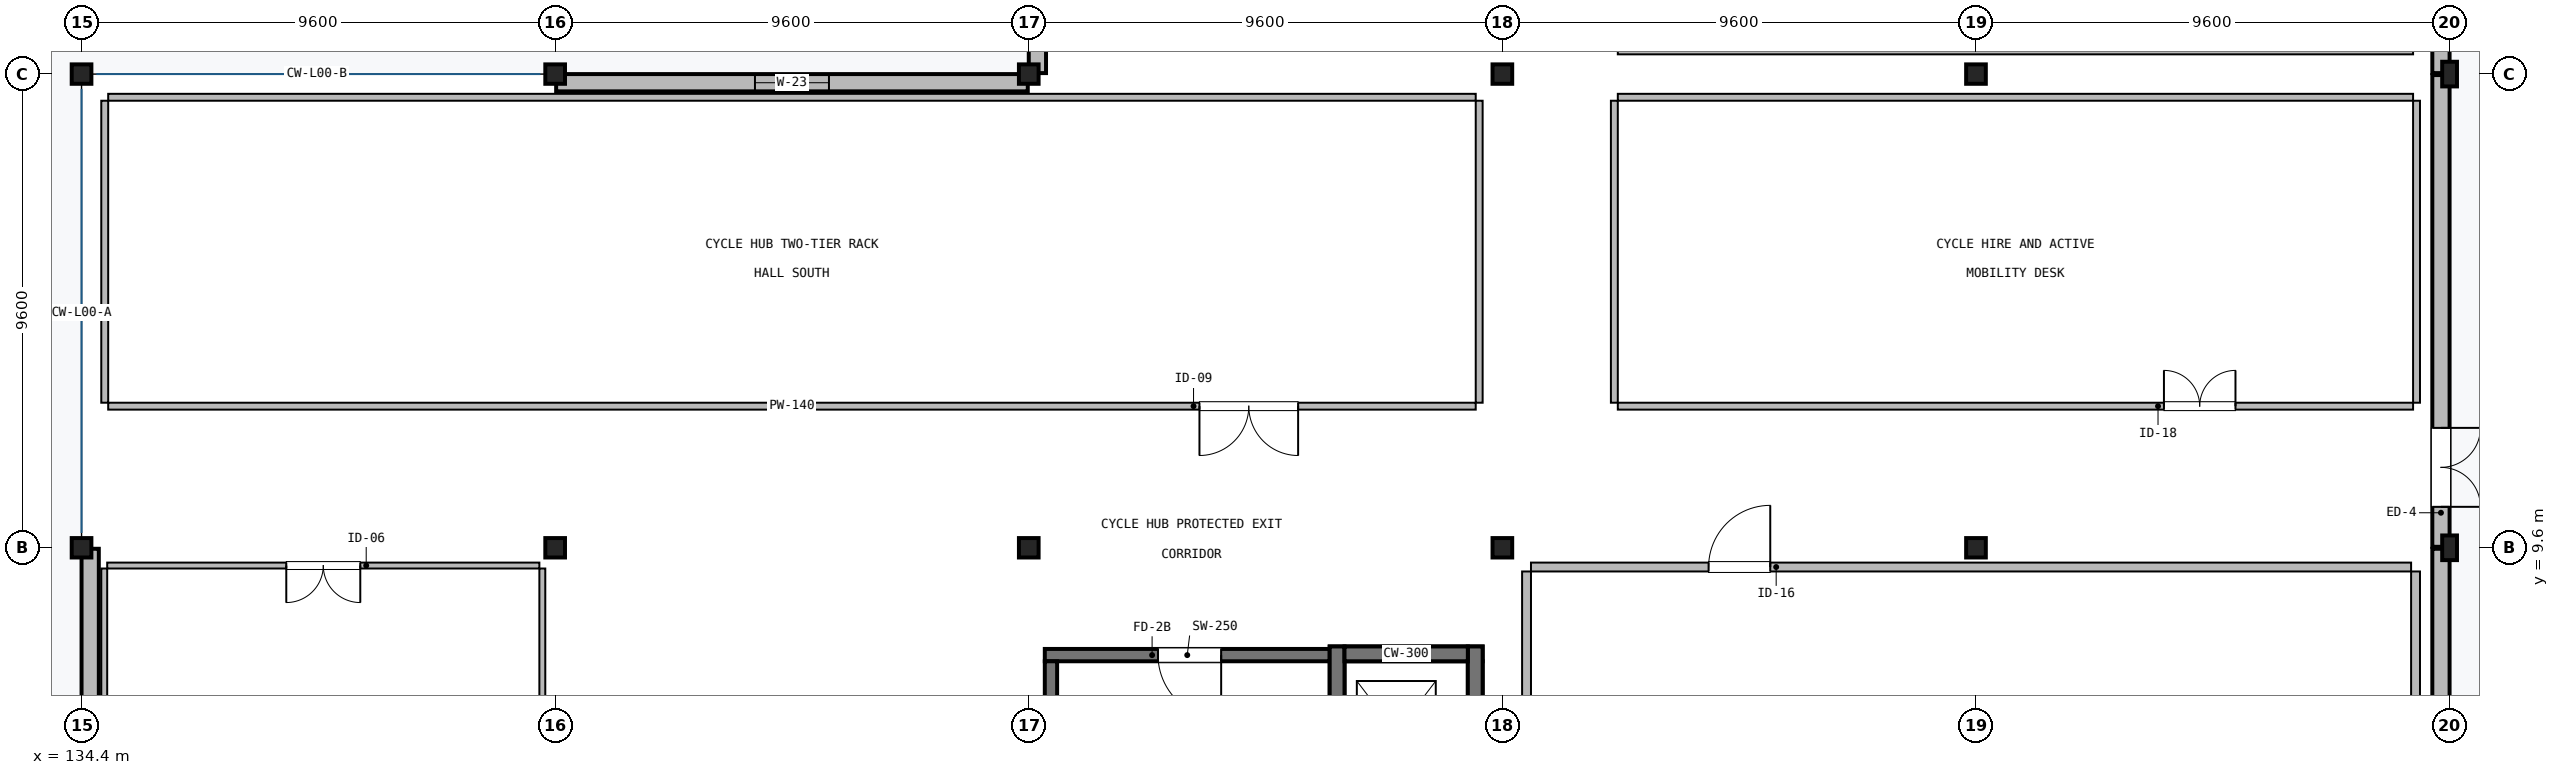
"""IFC4 building model, lengths in metres.
Left out: names, types, materials, properties, quantities, classifications, styles, units other than length and angle.
Written with IfcOpenShell. Run it as: python <this file> out.ifc"""

import sys

from ifc_helpers import new_model, si_unit, direction, frame, frame_2d, origin, origin_2d, place, context, subcontext, project, spatial, rectangle, i_section, extrude, element, fill, save


model = new_model("IFC4")
c1 = context("Model", 3, precision=1e-05, world=origin(), true_north=direction((0.0, 1.0)))
c2 = subcontext(c1, "Body", "Model", "MODEL_VIEW")
j1 = project(units=[si_unit("LENGTHUNIT", "METRE"), si_unit("PLANEANGLEUNIT", "RADIAN")], contexts=[c1])
p1 = place(None, origin())
s1 = spatial("IfcSite", under=j1, at=p1, CompositionType="ELEMENT")
p2 = place(p1, origin())
s2 = spatial("IfcBuilding", under=s1, at=p2, CompositionType="ELEMENT")
p3 = place(p2, origin())
s3 = spatial("IfcBuildingStorey", under=s2, at=p3, CompositionType="ELEMENT", Elevation=0.0)
for number, where, z_axis, x_axis in (
    (1, (134.4, 9.6, -0.36), (0.0, 0.0, 1.0), (1.0, 0.0, 0.0)),
    (2, (134.4, 19.2, -0.36), (0.0, 0.0, 1.0), (1.0, 0.0, 0.0)),
    (3, (144.0, 9.6, -0.36), (0.0, 0.0, 1.0), (1.0, 0.0, 0.0)),
    (4, (144.0, 19.2, -0.36), (0.0, 0.0, 1.0), (1.0, 0.0, 0.0)),
    (5, (153.6, 9.6, -0.36), (0.0, 0.0, 1.0), (1.0, 0.0, 0.0)),
    (6, (153.6, 19.2, -0.36), (0.0, 0.0, 1.0), (1.0, 0.0, 0.0)),
    (7, (163.2, 9.6, -0.36), (0.0, 0.0, 1.0), (1.0, 0.0, 0.0)),
    (8, (163.2, 19.2, -0.36), (0.0, 0.0, 1.0), (1.0, 0.0, 0.0)),
    (9, (172.8, 9.6, -0.36), (0.0, 0.0, 1.0), (1.0, 0.0, 0.0)),
    (10, (172.8, 19.2, -0.36), (0.0, 0.0, 1.0), (1.0, 0.0, 0.0)),
):
    element("IfcColumn", number, at=place(p3, frame(where, z_axis=z_axis, x_axis=x_axis)), inside=s3, PredefinedType="COLUMN", context=c2, shape_type="SweptSolid", body=[
        extrude(i_section(OverallWidth=0.399, OverallDepth=0.394, WebThickness=0.023, FlangeThickness=0.037, FilletRadius=0.015, at=origin_2d()), origin(), (0.0, 0.0, 1.0), 6.11),
    ])
for number, where, z_axis, x_axis in (
    (11, (182.4, 9.6, -0.36), (0.0, 0.0, 1.0), (1.0, 0.0, 0.0)),
    (12, (182.4, 19.2, -0.36), (0.0, 0.0, 1.0), (1.0, 0.0, 0.0)),
):
    element("IfcColumn", number, at=place(p3, frame(where, z_axis=z_axis, x_axis=x_axis)), inside=s3, PredefinedType="COLUMN", context=c2, shape_type="SweptSolid", body=[
        extrude(i_section(OverallWidth=0.3, OverallDepth=0.5, WebThickness=0.014, FlangeThickness=0.028, FilletRadius=0.027, at=origin_2d()), origin(), (0.0, 0.0, 1.0), 6.11),
    ])
p4 = place(p3, frame((159.85, 7.3, 0.0), z_axis=(0.0, 0.0, 1.0), x_axis=(0.0, -1.0, 0.0)))
e13 = element("IfcWall", 13, at=p4, inside=s3, PredefinedType="SHEAR", context=c2, shape_type="SweptSolid", body=[
    extrude(rectangle(XDim=2.7, YDim=0.3, at=frame_2d((1.35, 0.0))), origin(), (0.0, 0.0, 1.0), 5.75),
])
p5 = place(p4, frame((0.775, 0.0, 0.0)))
e14 = element("IfcOpeningElement", 14, at=p5, cuts=e13, PredefinedType="OPENING", context=c2, shape_type="SweptSolid", body=[
    extrude(rectangle(XDim=1.15, YDim=2.1, at=frame_2d((0.575, 1.05))), frame((0.0, 0.16, 0.0), z_axis=(0.0, -1.0, 0.0), x_axis=(1.0, 0.0, 0.0)), (0.0, 0.0, 1.0), 0.32),
])
p6 = place(p3, frame((162.65, 4.6, 0.0), z_axis=(0.0, 0.0, 1.0), x_axis=(0.0, 1.0, 0.0)))
e15 = element("IfcWall", 15, at=p6, inside=s3, PredefinedType="SHEAR", context=c2, shape_type="SweptSolid", body=[
    extrude(rectangle(XDim=2.7, YDim=0.3, at=frame_2d((1.35, 0.0))), origin(), (0.0, 0.0, 1.0), 5.75),
])
p7 = place(p3, frame((159.7, 7.45, 0.0), z_axis=(0.0, 0.0, 1.0), x_axis=(1.0, 0.0, 0.0)))
e16 = element("IfcWall", 16, at=p7, inside=s3, PredefinedType="SHEAR", context=c2, shape_type="SweptSolid", body=[
    extrude(rectangle(XDim=3.1, YDim=0.3, at=frame_2d((1.55, 0.0))), origin(), (0.0, 0.0, 1.0), 5.75),
])
p8 = place(p3, frame((159.7, 7.425, 0.0), z_axis=(0.0, 0.0, 1.0), x_axis=(-1.0, 0.0, 0.0)))
e17 = element("IfcWall", 17, at=p8, inside=s3, PredefinedType="SHEAR", context=c2, shape_type="SweptSolid", body=[
    extrude(rectangle(XDim=5.775, YDim=0.25, at=frame_2d((2.887, 0.0))), origin(), (0.0, 0.0, 1.0), 5.75),
])
p9 = place(p8, frame((2.2, 0.0, 0.0)))
e18 = element("IfcOpeningElement", 18, at=p9, cuts=e17, PredefinedType="OPENING", context=c2, shape_type="SweptSolid", body=[
    extrude(rectangle(XDim=1.28, YDim=2.2, at=frame_2d((0.64, 1.1))), frame((0.0, 0.135, 0.0), z_axis=(0.0, -1.0, 0.0), x_axis=(1.0, 0.0, 0.0)), (0.0, 0.0, 1.0), 0.27),
])
p10 = place(p3, frame((154.05, 4.6, 0.0), z_axis=(0.0, 0.0, 1.0), x_axis=(0.0, 1.0, 0.0)))
e19 = element("IfcWall", 19, at=p10, inside=s3, PredefinedType="SHEAR", context=c2, shape_type="SweptSolid", body=[
    extrude(rectangle(XDim=2.7, YDim=0.25, at=frame_2d((1.35, 0.0))), origin(), (0.0, 0.0, 1.0), 5.75),
])
for number, where, z_axis, x_axis in (
    (20, (159.85, 4.3, -1.2), (0.0, 0.0, 1.0), (0.0, 1.0, 0.0)),
    (21, (162.65, 4.3, -1.2), (0.0, 0.0, 1.0), (0.0, 1.0, 0.0)),
):
    element("IfcWall", number, at=place(p3, frame(where, z_axis=z_axis, x_axis=x_axis)), inside=s3, PredefinedType="SHEAR", context=c2, shape_type="SweptSolid", body=[
        extrude(rectangle(XDim=3.3, YDim=0.3, at=frame_2d((1.65, 0.0))), origin(), (0.0, 0.0, 1.0), 0.82),
    ])
p11 = place(p3, frame((160.0, 7.45, -1.2), z_axis=(0.0, 0.0, 1.0), x_axis=(1.0, 0.0, 0.0)))
e22 = element("IfcWall", 22, at=p11, inside=s3, PredefinedType="SHEAR", context=c2, shape_type="SweptSolid", body=[
    extrude(rectangle(XDim=2.5, YDim=0.3, at=frame_2d((1.25, 0.0))), origin(), (0.0, 0.0, 1.0), 0.82),
])
p12 = place(p3, frame((134.575, 0.02, 0.0), z_axis=(0.0, 0.0, 1.0), x_axis=(0.0, 1.0, 0.0)))
e23 = element("IfcWall", 23, at=p12, inside=s3, PredefinedType="SOLIDWALL", context=c2, shape_type="SweptSolid", body=[
    extrude(rectangle(XDim=9.56, YDim=0.35, at=frame_2d((4.78, 0.0))), origin(), (0.0, 0.0, 1.0), 5.217),
])
p13 = place(p12, frame((3.505, 0.0, 0.9)))
e24 = element("IfcOpeningElement", 24, at=p13, cuts=e23, PredefinedType="OPENING", context=c2, shape_type="SweptSolid", body=[
    extrude(rectangle(XDim=2.55, YDim=1.8, at=frame_2d((1.275, 0.9))), frame((0.0, 0.185, 0.0), z_axis=(0.0, -1.0, 0.0), x_axis=(1.0, 0.0, 0.0)), (0.0, 0.0, 1.0), 0.37),
])
p14 = place(p3, frame((144.02, 19.025, 0.0), z_axis=(0.0, 0.0, 1.0), x_axis=(1.0, 0.0, 0.0)))
e25 = element("IfcWall", 25, at=p14, inside=s3, PredefinedType="SOLIDWALL", context=c2, shape_type="SweptSolid", body=[
    extrude(rectangle(XDim=9.56, YDim=0.35, at=frame_2d((4.78, 0.0))), origin(), (0.0, 0.0, 1.0), 5.4),
])
p15 = place(p14, frame((4.03, 0.0, 0.9)))
e26 = element("IfcOpeningElement", 26, at=p15, cuts=e25, PredefinedType="OPENING", context=c2, shape_type="SweptSolid", body=[
    extrude(rectangle(XDim=1.5, YDim=2.1, at=frame_2d((0.75, 1.05))), frame((0.0, 0.185, 0.0), z_axis=(0.0, -1.0, 0.0), x_axis=(1.0, 0.0, 0.0)), (0.0, 0.0, 1.0), 0.37),
])
p16 = place(p3, frame((153.775, 19.22, 0.0), z_axis=(0.0, 0.0, 1.0), x_axis=(0.0, 1.0, 0.0)))
e27 = element("IfcWall", 27, at=p16, inside=s3, PredefinedType="SOLIDWALL", context=c2, shape_type="SweptSolid", body=[
    extrude(rectangle(XDim=9.56, YDim=0.35, at=frame_2d((4.78, 0.0))), origin(), (0.0, 0.0, 1.0), 5.217),
])
p17 = place(p16, frame((2.98, 0.0, 0.9)))
e28 = element("IfcOpeningElement", 28, at=p17, cuts=e27, PredefinedType="OPENING", context=c2, shape_type="SweptSolid", body=[
    extrude(rectangle(XDim=3.6, YDim=2.1, at=frame_2d((1.8, 1.05))), frame((0.0, 0.185, 0.0), z_axis=(0.0, -1.0, 0.0), x_axis=(1.0, 0.0, 0.0)), (0.0, 0.0, 1.0), 0.37),
])
p18 = place(p3, frame((182.225, 9.58, 0.0), z_axis=(0.0, 0.0, 1.0), x_axis=(0.0, -1.0, 0.0)))
e29 = element("IfcWall", 29, at=p18, inside=s3, PredefinedType="SOLIDWALL", context=c2, shape_type="SweptSolid", body=[
    extrude(rectangle(XDim=9.56, YDim=0.35, at=frame_2d((4.78, 0.0))), origin(), (0.0, 0.0, 1.0), 5.217),
])
p19 = place(p18, frame((4.03, 0.0, 0.9)))
e30 = element("IfcOpeningElement", 30, at=p19, cuts=e29, PredefinedType="OPENING", context=c2, shape_type="SweptSolid", body=[
    extrude(rectangle(XDim=1.5, YDim=1.5, at=frame_2d((0.75, 0.75))), frame((0.0, 0.185, 0.0), z_axis=(0.0, -1.0, 0.0), x_axis=(1.0, 0.0, 0.0)), (0.0, 0.0, 1.0), 0.37),
])
p20 = place(p3, frame((182.225, 19.18, 0.0), z_axis=(0.0, 0.0, 1.0), x_axis=(0.0, -1.0, 0.0)))
e31 = element("IfcWall", 31, at=p20, inside=s3, PredefinedType="SOLIDWALL", context=c2, shape_type="SweptSolid", body=[
    extrude(rectangle(XDim=9.56, YDim=0.35, at=frame_2d((4.78, 0.0))), origin(), (0.0, 0.0, 1.0), 5.217),
])
p21 = place(p20, frame((7.15, 0.0, 0.0)))
e32 = element("IfcOpeningElement", 32, at=p21, cuts=e31, PredefinedType="OPENING", context=c2, shape_type="SweptSolid", body=[
    extrude(rectangle(XDim=1.6, YDim=2.2, at=frame_2d((0.8, 1.1))), frame((0.0, 0.185, 0.0), z_axis=(0.0, -1.0, 0.0), x_axis=(1.0, 0.0, 0.0)), (0.0, 0.0, 1.0), 0.37),
])
p22 = place(p3, frame((182.225, 28.78, 0.0), z_axis=(0.0, 0.0, 1.0), x_axis=(0.0, -1.0, 0.0)))
e33 = element("IfcWall", 33, at=p22, inside=s3, PredefinedType="SOLIDWALL", context=c2, shape_type="SweptSolid", body=[
    extrude(rectangle(XDim=9.56, YDim=0.35, at=frame_2d((4.78, 0.0))), origin(), (0.0, 0.0, 1.0), 5.217),
])
p23 = place(p22, frame((3.43, 0.0, 0.9)))
e34 = element("IfcOpeningElement", 34, at=p23, cuts=e33, PredefinedType="OPENING", context=c2, shape_type="SweptSolid", body=[
    extrude(rectangle(XDim=2.7, YDim=1.5, at=frame_2d((1.35, 0.75))), frame((0.0, 0.185, 0.0), z_axis=(0.0, -1.0, 0.0), x_axis=(1.0, 0.0, 0.0)), (0.0, 0.0, 1.0), 0.37),
])
p24 = place(p3, frame((162.66, 12.47, 0.0), z_axis=(0.0, 0.0, 1.0), x_axis=(-1.0, 0.0, 0.0)))
e35 = element("IfcWall", 35, at=p24, inside=s3, PredefinedType="PARTITIONING", context=c2, shape_type="SweptSolid", body=[
    extrude(rectangle(XDim=27.72, YDim=0.14, at=frame_2d((13.86, 0.0))), origin(), (0.0, 0.0, 1.0), 5.207),
])
p25 = place(p24, frame((3.6, 0.0, 0.0)))
e36 = element("IfcOpeningElement", 36, at=p25, cuts=e35, PredefinedType="OPENING", context=c2, shape_type="SweptSolid", body=[
    extrude(rectangle(XDim=2.0, YDim=2.4, at=frame_2d((1.0, 1.2))), frame((0.0, 0.08, 0.0), z_axis=(0.0, -1.0, 0.0), x_axis=(1.0, 0.0, 0.0)), (0.0, 0.0, 1.0), 0.16),
])
p26 = place(p3, frame((134.94, 18.73, 0.0), z_axis=(0.0, 0.0, 1.0), x_axis=(1.0, 0.0, 0.0)))
e37 = element("IfcWall", 37, at=p26, inside=s3, PredefinedType="PARTITIONING", context=c2, shape_type="SweptSolid", body=[
    extrude(rectangle(XDim=27.72, YDim=0.14, at=frame_2d((13.86, 0.0))), origin(), (0.0, 0.0, 1.0), 5.207),
])
for number, where, z_axis, x_axis in (
    (38, (134.87, 12.54, 0.0), (0.0, 0.0, 1.0), (0.0, 1.0, 0.0)),
    (39, (162.73, 18.66, 0.0), (0.0, 0.0, 1.0), (0.0, -1.0, 0.0)),
):
    element("IfcWall", number, at=place(p3, frame(where, z_axis=z_axis, x_axis=x_axis)), inside=s3, PredefinedType="PARTITIONING", context=c2, shape_type="SweptSolid", body=[
        extrude(rectangle(XDim=6.12, YDim=0.14, at=frame_2d((3.06, 0.0))), origin(), (0.0, 0.0, 1.0), 5.39),
    ])
p27 = place(p3, frame((181.66, 19.67, 0.0), z_axis=(0.0, 0.0, 1.0), x_axis=(-1.0, 0.0, 0.0)))
e40 = element("IfcWall", 40, at=p27, inside=s3, PredefinedType="PARTITIONING", context=c2, shape_type="SweptSolid", body=[
    extrude(rectangle(XDim=16.12, YDim=0.14, at=frame_2d((8.06, 0.0))), origin(), (0.0, 0.0, 1.0), 5.207),
])
p28 = place(p3, frame((163.78, 9.21, 0.0), z_axis=(0.0, 0.0, 1.0), x_axis=(1.0, 0.0, 0.0)))
e41 = element("IfcWall", 41, at=p28, inside=s3, PredefinedType="PARTITIONING", context=c2, shape_type="SweptSolid", body=[
    extrude(rectangle(XDim=17.84, YDim=0.18, at=frame_2d((8.92, 0.0))), origin(), (0.0, 0.0, 1.0), 5.207),
])
p29 = place(p28, frame((3.6, 0.0, 0.0)))
e42 = element("IfcOpeningElement", 42, at=p29, cuts=e41, PredefinedType="OPENING", context=c2, shape_type="SweptSolid", body=[
    extrude(rectangle(XDim=1.25, YDim=2.25, at=frame_2d((0.625, 1.125))), frame((0.0, 0.1, 0.0), z_axis=(0.0, -1.0, 0.0), x_axis=(1.0, 0.0, 0.0)), (0.0, 0.0, 1.0), 0.2),
])
for number, where, z_axis, x_axis in (
    (43, (163.69, 0.68, 0.0), (0.0, 0.0, 1.0), (0.0, 1.0, 0.0)),
    (44, (181.71, 9.12, 0.0), (0.0, 0.0, 1.0), (0.0, -1.0, 0.0)),
):
    element("IfcWall", number, at=place(p3, frame(where, z_axis=z_axis, x_axis=x_axis)), inside=s3, PredefinedType="PARTITIONING", context=c2, shape_type="SweptSolid", body=[
        extrude(rectangle(XDim=8.44, YDim=0.18, at=frame_2d((4.22, 0.0))), origin(), (0.0, 0.0, 1.0), 5.39),
    ])
p30 = place(p3, frame((181.66, 12.47, 0.0), z_axis=(0.0, 0.0, 1.0), x_axis=(-1.0, 0.0, 0.0)))
e45 = element("IfcWall", 45, at=p30, inside=s3, PredefinedType="PARTITIONING", context=c2, shape_type="SweptSolid", body=[
    extrude(rectangle(XDim=16.12, YDim=0.14, at=frame_2d((8.06, 0.0))), origin(), (0.0, 0.0, 1.0), 5.207),
])
p31 = place(p30, frame((3.6, 0.0, 0.0)))
e46 = element("IfcOpeningElement", 46, at=p31, cuts=e45, PredefinedType="OPENING", context=c2, shape_type="SweptSolid", body=[
    extrude(rectangle(XDim=1.45, YDim=2.25, at=frame_2d((0.725, 1.125))), frame((0.0, 0.08, 0.0), z_axis=(0.0, -1.0, 0.0), x_axis=(1.0, 0.0, 0.0)), (0.0, 0.0, 1.0), 0.16),
])
p32 = place(p3, frame((165.54, 18.73, 0.0), z_axis=(0.0, 0.0, 1.0), x_axis=(1.0, 0.0, 0.0)))
e47 = element("IfcWall", 47, at=p32, inside=s3, PredefinedType="PARTITIONING", context=c2, shape_type="SweptSolid", body=[
    extrude(rectangle(XDim=16.12, YDim=0.14, at=frame_2d((8.06, 0.0))), origin(), (0.0, 0.0, 1.0), 5.207),
])
for number, where, z_axis, x_axis in (
    (48, (165.47, 12.54, 0.0), (0.0, 0.0, 1.0), (0.0, 1.0, 0.0)),
    (49, (181.73, 18.66, 0.0), (0.0, 0.0, 1.0), (0.0, -1.0, 0.0)),
):
    element("IfcWall", number, at=place(p3, frame(where, z_axis=z_axis, x_axis=x_axis)), inside=s3, PredefinedType="PARTITIONING", context=c2, shape_type="SweptSolid", body=[
        extrude(rectangle(XDim=6.12, YDim=0.14, at=frame_2d((3.06, 0.0))), origin(), (0.0, 0.0, 1.0), 5.39),
    ])
p33 = place(p3, frame((134.92, 9.24, 0.0), z_axis=(0.0, 0.0, 1.0), x_axis=(1.0, 0.0, 0.0)))
e50 = element("IfcWall", 50, at=p33, inside=s3, PredefinedType="PARTITIONING", context=c2, shape_type="SweptSolid", body=[
    extrude(rectangle(XDim=8.76, YDim=0.12, at=frame_2d((4.38, 0.0))), origin(), (0.0, 0.0, 1.0), 5.39),
])
p34 = place(p33, frame((3.63, 0.0, 0.0)))
e51 = element("IfcOpeningElement", 51, at=p34, cuts=e50, PredefinedType="OPENING", context=c2, shape_type="SweptSolid", body=[
    extrude(rectangle(XDim=1.5, YDim=2.25, at=frame_2d((0.75, 1.125))), frame((0.0, 0.07, 0.0), z_axis=(0.0, -1.0, 0.0), x_axis=(1.0, 0.0, 0.0)), (0.0, 0.0, 1.0), 0.14),
])
for number, where, z_axis, x_axis in (
    (52, (134.86, 0.62, 0.0), (0.0, 0.0, 1.0), (0.0, 1.0, 0.0)),
    (53, (143.74, 9.18, 0.0), (0.0, 0.0, 1.0), (0.0, -1.0, 0.0)),
):
    element("IfcWall", number, at=place(p3, frame(where, z_axis=z_axis, x_axis=x_axis)), inside=s3, PredefinedType="PARTITIONING", context=c2, shape_type="SweptSolid", body=[
        extrude(rectangle(XDim=8.56, YDim=0.12, at=frame_2d((4.28, 0.0))), origin(), (0.0, 0.0, 1.0), 5.39),
    ])
p35 = place(p9, origin())
e54 = element("IfcDoor", 54, at=p35, inside=s3, OperationType="SINGLE_SWING_LEFT", PredefinedType="DOOR", context=c2, shape_type="SweptSolid", body=[
    extrude(rectangle(XDim=1.28, YDim=2.2, at=frame_2d((0.64, 1.1))), frame((0.0, 0.025, 0.0), z_axis=(0.0, -1.0, 0.0), x_axis=(1.0, 0.0, 0.0)), (0.0, 0.0, 1.0), 0.05),
])
fill(e18, e54)
p36 = place(p15, origin())
e55 = element("IfcWindow", 55, at=p36, inside=s3, PartitioningType="SINGLE_PANEL", PredefinedType="WINDOW", context=c2, shape_type="SweptSolid", body=[
    extrude(rectangle(XDim=1.5, YDim=2.1, at=frame_2d((0.75, 1.05))), frame((0.0, 0.03, 0.0), z_axis=(0.0, -1.0, 0.0), x_axis=(1.0, 0.0, 0.0)), (0.0, 0.0, 1.0), 0.06),
])
fill(e26, e55)
p37 = place(p21, origin())
e56 = element("IfcDoor", 56, at=p37, inside=s3, OperationType="DOUBLE_DOOR_SINGLE_SWING", PredefinedType="DOOR", context=c2, shape_type="SweptSolid", body=[
    extrude(rectangle(XDim=1.6, YDim=2.2, at=frame_2d((0.8, 1.1))), frame((0.0, 0.025, 0.0), z_axis=(0.0, -1.0, 0.0), x_axis=(1.0, 0.0, 0.0)), (0.0, 0.0, 1.0), 0.05),
])
fill(e32, e56)
p38 = place(p25, origin())
e57 = element("IfcDoor", 57, at=p38, inside=s3, OperationType="DOUBLE_DOOR_SINGLE_SWING", PredefinedType="DOOR", context=c2, shape_type="SweptSolid", body=[
    extrude(rectangle(XDim=2.0, YDim=2.4, at=frame_2d((1.0, 1.2))), frame((0.0, 0.025, 0.0), z_axis=(0.0, -1.0, 0.0), x_axis=(1.0, 0.0, 0.0)), (0.0, 0.0, 1.0), 0.05),
])
fill(e36, e57)
p39 = place(p29, origin())
e58 = element("IfcDoor", 58, at=p39, inside=s3, OperationType="SINGLE_SWING_RIGHT", PredefinedType="DOOR", context=c2, shape_type="SweptSolid", body=[
    extrude(rectangle(XDim=1.25, YDim=2.25, at=frame_2d((0.625, 1.125))), frame((0.0, 0.025, 0.0), z_axis=(0.0, -1.0, 0.0), x_axis=(1.0, 0.0, 0.0)), (0.0, 0.0, 1.0), 0.05),
])
fill(e42, e58)
p40 = place(p31, frame((1.45, 0.0, 0.0), z_axis=(0.0, 0.0, 1.0), x_axis=(-1.0, 0.0, 0.0)))
e59 = element("IfcDoor", 59, at=p40, inside=s3, OperationType="DOUBLE_DOOR_SINGLE_SWING", PredefinedType="DOOR", context=c2, shape_type="SweptSolid", body=[
    extrude(rectangle(XDim=1.45, YDim=2.25, at=frame_2d((0.725, 1.125))), frame((0.0, 0.025, 0.0), z_axis=(0.0, -1.0, 0.0), x_axis=(1.0, 0.0, 0.0)), (0.0, 0.0, 1.0), 0.05),
])
fill(e46, e59)
p41 = place(p34, frame((1.5, 0.0, 0.0), z_axis=(0.0, 0.0, 1.0), x_axis=(-1.0, 0.0, 0.0)))
e60 = element("IfcDoor", 60, at=p41, inside=s3, OperationType="DOUBLE_DOOR_SINGLE_SWING", PredefinedType="DOOR", context=c2, shape_type="SweptSolid", body=[
    extrude(rectangle(XDim=1.5, YDim=2.25, at=frame_2d((0.75, 1.125))), frame((0.0, 0.025, 0.0), z_axis=(0.0, -1.0, 0.0), x_axis=(1.0, 0.0, 0.0)), (0.0, 0.0, 1.0), 0.05),
])
fill(e51, e60)
save(model, sys.argv[1])
